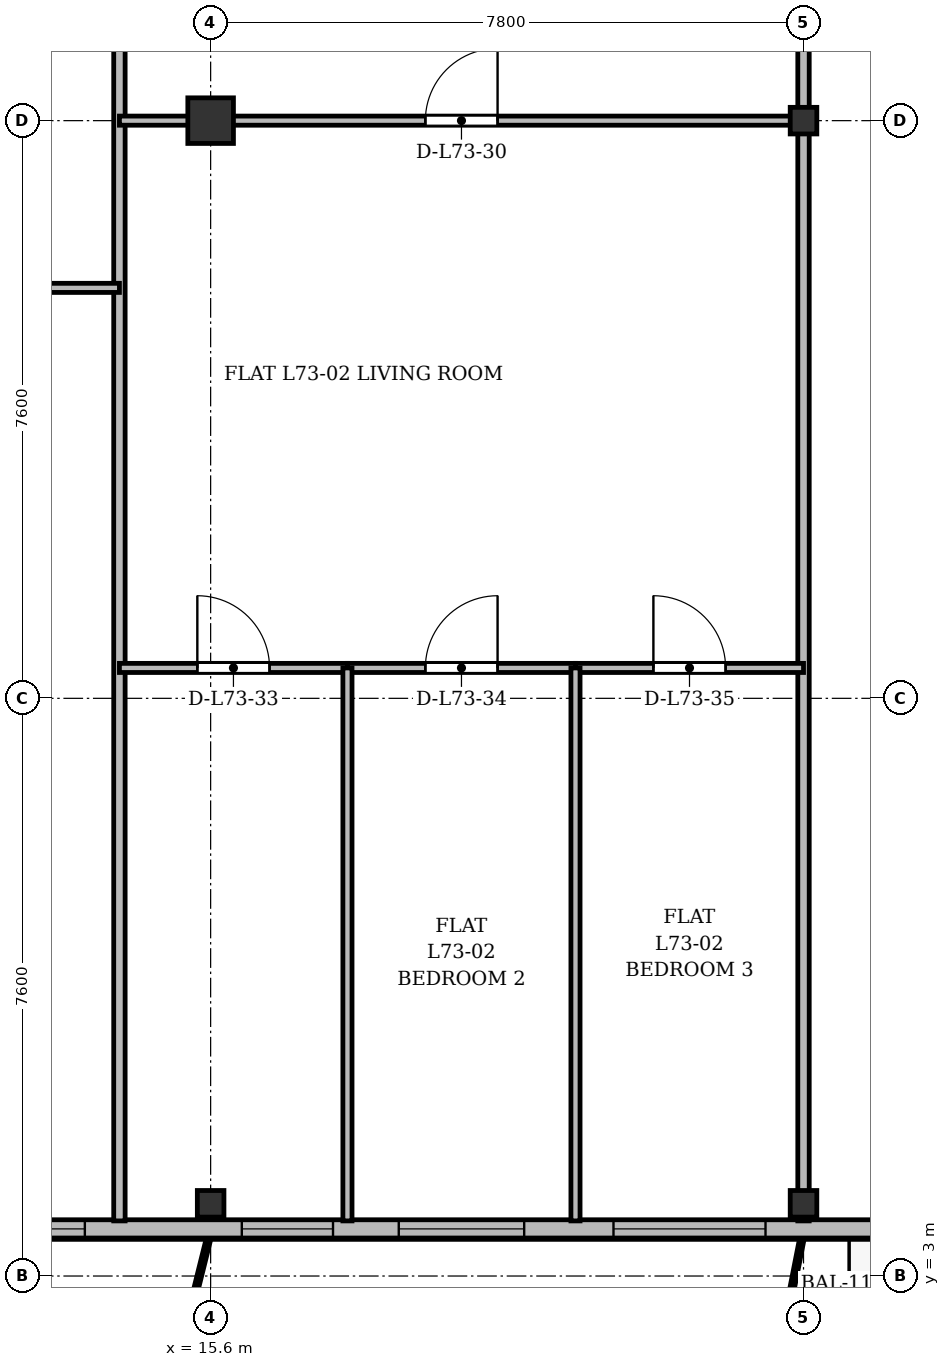
"""IFC4 building model, lengths in metres.
Left out: names, types, materials, properties, quantities, classifications, styles, units other than length and angle.
Written with IfcOpenShell. Run it as: python <this file> out.ifc"""

import sys

from ifc_helpers import new_model, si_unit, direction, frame, frame_2d, origin, origin_2d, place, context, subcontext, project, spatial, rectangle, i_section, extrude, source, transform, mapped, element, fill, save


model = new_model("IFC4")
c1 = context("Model", 3, precision=1e-05, world=origin(), true_north=direction((0.0, 1.0)))
c2 = subcontext(c1, "Body", "Model", "MODEL_VIEW")
j1 = project(units=[si_unit("LENGTHUNIT", "METRE"), si_unit("PLANEANGLEUNIT", "RADIAN")], contexts=[c1])
p1 = place(None, origin())
s1 = spatial("IfcSite", under=j1, at=p1, CompositionType="ELEMENT")
p2 = place(p1, origin())
s2 = spatial("IfcBuilding", under=s1, at=p2, CompositionType="ELEMENT")
p3 = place(p2, frame((0.0, 0.0, 281.1)))
s3 = spatial("IfcBuildingStorey", under=s2, at=p3, CompositionType="ELEMENT", Elevation=281.1)
m1 = source(origin(), c2, "Body", "SweptSolid", [
    extrude(i_section(OverallWidth=0.35, OverallDepth=0.35, WebThickness=0.018, FlangeThickness=0.028, at=origin_2d()), origin(), (0.0, 0.0, 1.0), 3.6),
])
p4 = place(p3, frame((15.6, 3.95, 0.0), z_axis=(0.0, 0.0, 1.0), x_axis=(1.0, 0.0, 0.0)))
e1 = element("IfcColumn", 1, at=p4, inside=s3, PredefinedType="COLUMN", context=c2, shape_type="MappedRepresentation", body=[
    mapped(m1, transform((0.0, 0.0, 0.0), x_axis=(1.0, 0.0, 0.0), y_axis=(0.0, 1.0, 0.0), z_axis=(0.0, 0.0, 1.0), scale=1.0)),
])
m2 = source(origin(), c2, "Body", "SweptSolid", [
    extrude(rectangle(XDim=0.6, YDim=0.6, at=origin_2d()), origin(), (0.0, 0.0, 1.0), 3.6),
])
p5 = place(p3, frame((15.6, 18.2, 0.0), z_axis=(0.0, 0.0, 1.0), x_axis=(1.0, 0.0, 0.0)))
e2 = element("IfcColumn", 2, at=p5, inside=s3, PredefinedType="COLUMN", context=c2, shape_type="MappedRepresentation", body=[
    mapped(m2, transform((0.0, 0.0, 0.0), x_axis=(1.0, 0.0, 0.0), y_axis=(0.0, 1.0, 0.0), z_axis=(0.0, 0.0, 1.0), scale=1.0)),
])
for number, where, z_axis, x_axis in (
    (3, (23.4, 3.95, 0.0), (0.0, 0.0, 1.0), (1.0, 0.0, 0.0)),
    (4, (23.4, 18.2, 0.0), (0.0, 0.0, 1.0), (1.0, 0.0, 0.0)),
):
    element("IfcColumn", number, at=place(p3, frame(where, z_axis=z_axis, x_axis=x_axis)), inside=s3, PredefinedType="COLUMN", context=c2, shape_type="MappedRepresentation", body=[
        mapped(m1, transform((0.0, 0.0, 0.0), x_axis=(1.0, 0.0, 0.0), y_axis=(0.0, 1.0, 0.0), z_axis=(0.0, 0.0, 1.0), scale=1.0)),
    ])
p6 = place(p3, frame((63.2, 3.62, 0.0), z_axis=(0.0, 0.0, 1.0), x_axis=(-1.0, 0.0, 0.0)))
e5 = element("IfcWall", 5, at=p6, inside=s3, PredefinedType="SOLIDWALL", context=c2, shape_type="SweptSolid", body=[
    extrude(rectangle(XDim=52.0, YDim=0.24, at=frame_2d((26.0, 0.0))), origin(), (0.0, 0.0, 1.0), 3.37),
])
p7 = place(p6, frame((0.745, 0.0, 0.9)))
e6 = element("IfcOpeningElement", 6, at=p7, cuts=e5, PredefinedType="OPENING", context=c2, shape_type="SweptSolid", body=[
    extrude(rectangle(XDim=2.0, YDim=1.95, at=frame_2d((1.0, 0.975))), frame((0.0, 0.13, 0.0), z_axis=(0.0, -1.0, 0.0), x_axis=(1.0, 0.0, 0.0)), (0.0, 0.0, 1.0), 0.26),
])
p8 = place(p6, frame((4.793, 0.0, 0.9)))
e7 = element("IfcOpeningElement", 7, at=p8, cuts=e5, PredefinedType="OPENING", context=c2, shape_type="SweptSolid", body=[
    extrude(rectangle(XDim=1.35, YDim=1.5, at=frame_2d((0.675, 0.75))), frame((0.0, 0.13, 0.0), z_axis=(0.0, -1.0, 0.0), x_axis=(1.0, 0.0, 0.0)), (0.0, 0.0, 1.0), 0.26),
])
p9 = place(p6, frame((6.685, 0.0, 0.0)))
e8 = element("IfcOpeningElement", 8, at=p9, cuts=e5, PredefinedType="OPENING", context=c2, shape_type="SweptSolid", body=[
    extrude(rectangle(XDim=1.2, YDim=2.2, at=frame_2d((0.6, 1.1))), frame((0.0, 0.13, 0.0), z_axis=(0.0, -1.0, 0.0), x_axis=(1.0, 0.0, 0.0)), (0.0, 0.0, 1.0), 0.26),
])
p10 = place(p6, frame((9.634, 0.0, 0.9)))
e9 = element("IfcOpeningElement", 9, at=p10, cuts=e5, PredefinedType="OPENING", context=c2, shape_type="SweptSolid", body=[
    extrude(rectangle(XDim=2.2, YDim=1.8, at=frame_2d((1.1, 0.9))), frame((0.0, 0.13, 0.0), z_axis=(0.0, -1.0, 0.0), x_axis=(1.0, 0.0, 0.0)), (0.0, 0.0, 1.0), 0.26),
])
p11 = place(p6, frame((13.45, 0.0, 0.9)))
e10 = element("IfcOpeningElement", 10, at=p11, cuts=e5, PredefinedType="OPENING", context=c2, shape_type="SweptSolid", body=[
    extrude(rectangle(XDim=1.5, YDim=1.75, at=frame_2d((0.75, 0.875))), frame((0.0, 0.13, 0.0), z_axis=(0.0, -1.0, 0.0), x_axis=(1.0, 0.0, 0.0)), (0.0, 0.0, 1.0), 0.26),
])
p12 = place(p6, frame((16.8, 0.0, 0.9)))
e11 = element("IfcOpeningElement", 11, at=p12, cuts=e5, PredefinedType="OPENING", context=c2, shape_type="SweptSolid", body=[
    extrude(rectangle(XDim=2.0, YDim=1.95, at=frame_2d((1.0, 0.975))), frame((0.0, 0.13, 0.0), z_axis=(0.0, -1.0, 0.0), x_axis=(1.0, 0.0, 0.0)), (0.0, 0.0, 1.0), 0.26),
])
p13 = place(p6, frame((21.375, 0.0, 0.9)))
e12 = element("IfcOpeningElement", 12, at=p13, cuts=e5, PredefinedType="OPENING", context=c2, shape_type="SweptSolid", body=[
    extrude(rectangle(XDim=1.65, YDim=1.85, at=frame_2d((0.825, 0.925))), frame((0.0, 0.13, 0.0), z_axis=(0.0, -1.0, 0.0), x_axis=(1.0, 0.0, 0.0)), (0.0, 0.0, 1.0), 0.26),
])
p14 = place(p6, frame((27.9, 0.0, 0.9)))
e13 = element("IfcOpeningElement", 13, at=p14, cuts=e5, PredefinedType="OPENING", context=c2, shape_type="SweptSolid", body=[
    extrude(rectangle(XDim=1.8, YDim=1.8, at=frame_2d((0.9, 0.9))), frame((0.0, 0.13, 0.0), z_axis=(0.0, -1.0, 0.0), x_axis=(1.0, 0.0, 0.0)), (0.0, 0.0, 1.0), 0.26),
])
p15 = place(p6, frame((33.873, 0.0, 0.0)))
e14 = element("IfcOpeningElement", 14, at=p15, cuts=e5, PredefinedType="OPENING", context=c2, shape_type="SweptSolid", body=[
    extrude(rectangle(XDim=1.2, YDim=2.2, at=frame_2d((0.6, 1.1))), frame((0.0, 0.13, 0.0), z_axis=(0.0, -1.0, 0.0), x_axis=(1.0, 0.0, 0.0)), (0.0, 0.0, 1.0), 0.26),
])
p16 = place(p6, frame((37.05, 0.0, 0.9)))
e15 = element("IfcOpeningElement", 15, at=p16, cuts=e5, PredefinedType="OPENING", context=c2, shape_type="SweptSolid", body=[
    extrude(rectangle(XDim=1.5, YDim=1.75, at=frame_2d((0.75, 0.875))), frame((0.0, 0.13, 0.0), z_axis=(0.0, -1.0, 0.0), x_axis=(1.0, 0.0, 0.0)), (0.0, 0.0, 1.0), 0.26),
])
p17 = place(p6, frame((40.3, 0.0, 0.9)))
e16 = element("IfcOpeningElement", 16, at=p17, cuts=e5, PredefinedType="OPENING", context=c2, shape_type="SweptSolid", body=[
    extrude(rectangle(XDim=2.0, YDim=1.95, at=frame_2d((1.0, 0.975))), frame((0.0, 0.13, 0.0), z_axis=(0.0, -1.0, 0.0), x_axis=(1.0, 0.0, 0.0)), (0.0, 0.0, 1.0), 0.26),
])
p18 = place(p6, frame((43.475, 0.0, 0.9)))
e17 = element("IfcOpeningElement", 17, at=p18, cuts=e5, PredefinedType="OPENING", context=c2, shape_type="SweptSolid", body=[
    extrude(rectangle(XDim=1.65, YDim=1.85, at=frame_2d((0.825, 0.925))), frame((0.0, 0.13, 0.0), z_axis=(0.0, -1.0, 0.0), x_axis=(1.0, 0.0, 0.0)), (0.0, 0.0, 1.0), 0.26),
])
p19 = place(p6, frame((45.99, 0.0, 0.9)))
e18 = element("IfcOpeningElement", 18, at=p19, cuts=e5, PredefinedType="OPENING", context=c2, shape_type="SweptSolid", body=[
    extrude(rectangle(XDim=1.2, YDim=1.65, at=frame_2d((0.6, 0.825))), frame((0.0, 0.13, 0.0), z_axis=(0.0, -1.0, 0.0), x_axis=(1.0, 0.0, 0.0)), (0.0, 0.0, 1.0), 0.26),
])
p20 = place(p6, frame((49.255, 0.0, 0.9)))
e19 = element("IfcOpeningElement", 19, at=p20, cuts=e5, PredefinedType="OPENING", context=c2, shape_type="SweptSolid", body=[
    extrude(rectangle(XDim=2.2, YDim=1.8, at=frame_2d((1.1, 0.9))), frame((0.0, 0.13, 0.0), z_axis=(0.0, -1.0, 0.0), x_axis=(1.0, 0.0, 0.0)), (0.0, 0.0, 1.0), 0.26),
])
p21 = place(p3, frame((14.4, 3.725, 0.0), z_axis=(0.0, 0.0, 1.0), x_axis=(0.0, 1.0, 0.0)))
e20 = element("IfcWall", 20, at=p21, inside=s3, PredefinedType="PARTITIONING", context=c2, shape_type="SweptSolid", body=[
    extrude(rectangle(XDim=27.275, YDim=0.15, at=frame_2d((13.637, 0.0))), origin(), (0.0, 0.0, 1.0), 2.92),
])
p22 = place(p3, frame((23.4, 3.725, 0.0), z_axis=(0.0, 0.0, 1.0), x_axis=(0.0, 1.0, 0.0)))
e21 = element("IfcWall", 21, at=p22, inside=s3, PredefinedType="PARTITIONING", context=c2, shape_type="SweptSolid", body=[
    extrude(rectangle(XDim=27.275, YDim=0.15, at=frame_2d((13.637, 0.0))), origin(), (0.0, 0.0, 1.0), 2.87),
])
p23 = place(p3, frame((8.425, 16.0, 0.0), z_axis=(0.0, 0.0, 1.0), x_axis=(1.0, 0.0, 0.0)))
e22 = element("IfcWall", 22, at=p23, inside=s3, PredefinedType="PARTITIONING", context=c2, shape_type="SweptSolid", body=[
    extrude(rectangle(XDim=5.975, YDim=0.12, at=frame_2d((2.987, 0.0))), origin(), (0.0, 0.0, 1.0), 2.87),
])
p24 = place(p23, frame((2.42, 0.0, 0.0)))
e23 = element("IfcOpeningElement", 23, at=p24, cuts=e22, PredefinedType="OPENING", context=c2, shape_type="SweptSolid", body=[
    extrude(rectangle(XDim=0.95, YDim=2.15, at=frame_2d((0.475, 1.075))), frame((0.0, 0.07, 0.0), z_axis=(0.0, -1.0, 0.0), x_axis=(1.0, 0.0, 0.0)), (0.0, 0.0, 1.0), 0.14),
])
p25 = place(p3, frame((14.4, 18.2, 0.0), z_axis=(0.0, 0.0, 1.0), x_axis=(1.0, 0.0, 0.0)))
e24 = element("IfcWall", 24, at=p25, inside=s3, PredefinedType="PARTITIONING", context=c2, shape_type="SweptSolid", body=[
    extrude(rectangle(XDim=9.0, YDim=0.12, at=frame_2d((4.5, 0.0))), origin(), (0.0, 0.0, 1.0), 2.92),
])
p26 = place(p25, frame((4.025, 0.0, 0.0)))
e25 = element("IfcOpeningElement", 25, at=p26, cuts=e24, PredefinedType="OPENING", context=c2, shape_type="SweptSolid", body=[
    extrude(rectangle(XDim=0.95, YDim=2.15, at=frame_2d((0.475, 1.075))), frame((0.0, 0.07, 0.0), z_axis=(0.0, -1.0, 0.0), x_axis=(1.0, 0.0, 0.0)), (0.0, 0.0, 1.0), 0.14),
])
p27 = place(p3, frame((14.4, 11.0, 0.0), z_axis=(0.0, 0.0, 1.0), x_axis=(1.0, 0.0, 0.0)))
e26 = element("IfcWall", 26, at=p27, inside=s3, PredefinedType="PARTITIONING", context=c2, shape_type="SweptSolid", body=[
    extrude(rectangle(XDim=3.0, YDim=0.12, at=frame_2d((1.5, 0.0))), origin(), (0.0, 0.0, 1.0), 2.87),
])
p28 = place(p27, frame((1.025, 0.0, 0.0)))
e27 = element("IfcOpeningElement", 27, at=p28, cuts=e26, PredefinedType="OPENING", context=c2, shape_type="SweptSolid", body=[
    extrude(rectangle(XDim=0.95, YDim=2.15, at=frame_2d((0.475, 1.075))), frame((0.0, 0.07, 0.0), z_axis=(0.0, -1.0, 0.0), x_axis=(1.0, 0.0, 0.0)), (0.0, 0.0, 1.0), 0.14),
])
p29 = place(p3, frame((17.4, 11.0, 0.0), z_axis=(0.0, 0.0, 1.0), x_axis=(1.0, 0.0, 0.0)))
e28 = element("IfcWall", 28, at=p29, inside=s3, PredefinedType="PARTITIONING", context=c2, shape_type="SweptSolid", body=[
    extrude(rectangle(XDim=3.0, YDim=0.12, at=frame_2d((1.5, 0.0))), origin(), (0.0, 0.0, 1.0), 3.37),
])
p30 = place(p29, frame((1.025, 0.0, 0.0)))
e29 = element("IfcOpeningElement", 29, at=p30, cuts=e28, PredefinedType="OPENING", context=c2, shape_type="SweptSolid", body=[
    extrude(rectangle(XDim=0.95, YDim=2.15, at=frame_2d((0.475, 1.075))), frame((0.0, 0.07, 0.0), z_axis=(0.0, -1.0, 0.0), x_axis=(1.0, 0.0, 0.0)), (0.0, 0.0, 1.0), 0.14),
])
p31 = place(p3, frame((17.4, 3.725, 0.0), z_axis=(0.0, 0.0, 1.0), x_axis=(0.0, 1.0, 0.0)))
e30 = element("IfcWall", 30, at=p31, inside=s3, PredefinedType="PARTITIONING", context=c2, shape_type="SweptSolid", body=[
    extrude(rectangle(XDim=7.275, YDim=0.12, at=frame_2d((3.637, 0.0))), origin(), (0.0, 0.0, 1.0), 2.92),
])
p32 = place(p3, frame((20.4, 11.0, 0.0), z_axis=(0.0, 0.0, 1.0), x_axis=(1.0, 0.0, 0.0)))
e31 = element("IfcWall", 31, at=p32, inside=s3, PredefinedType="PARTITIONING", context=c2, shape_type="SweptSolid", body=[
    extrude(rectangle(XDim=3.0, YDim=0.12, at=frame_2d((1.5, 0.0))), origin(), (0.0, 0.0, 1.0), 2.87),
])
p33 = place(p32, frame((1.025, 0.0, 0.0)))
e32 = element("IfcOpeningElement", 32, at=p33, cuts=e31, PredefinedType="OPENING", context=c2, shape_type="SweptSolid", body=[
    extrude(rectangle(XDim=0.95, YDim=2.15, at=frame_2d((0.475, 1.075))), frame((0.0, 0.07, 0.0), z_axis=(0.0, -1.0, 0.0), x_axis=(1.0, 0.0, 0.0)), (0.0, 0.0, 1.0), 0.14),
])
p34 = place(p3, frame((20.4, 3.725, 0.0), z_axis=(0.0, 0.0, 1.0), x_axis=(0.0, 1.0, 0.0)))
e33 = element("IfcWall", 33, at=p34, inside=s3, PredefinedType="PARTITIONING", context=c2, shape_type="SweptSolid", body=[
    extrude(rectangle(XDim=7.275, YDim=0.12, at=frame_2d((3.637, 0.0))), origin(), (0.0, 0.0, 1.0), 2.92),
])
m3 = source(origin(), c2, "Body", "SweptSolid", [
    extrude(rectangle(XDim=2.0, YDim=1.95, at=frame_2d((1.0, 0.975))), frame((0.0, 0.03, 0.0), z_axis=(0.0, -1.0, 0.0), x_axis=(1.0, 0.0, 0.0)), (0.0, 0.0, 1.0), 0.06),
])
p35 = place(p17, origin())
e34 = element("IfcWindow", 34, at=p35, inside=s3, PartitioningType="SINGLE_PANEL", PredefinedType="WINDOW", context=c2, shape_type="MappedRepresentation", body=[
    mapped(m3, transform((0.0, 0.0, 0.0), x_axis=(1.0, 0.0, 0.0), y_axis=(0.0, 1.0, 0.0), z_axis=(0.0, 0.0, 1.0), scale=1.0)),
])
fill(e16, e34)
m4 = source(origin(), c2, "Body", "SweptSolid", [
    extrude(rectangle(XDim=1.65, YDim=1.85, at=frame_2d((0.825, 0.925))), frame((0.0, 0.03, 0.0), z_axis=(0.0, -1.0, 0.0), x_axis=(1.0, 0.0, 0.0)), (0.0, 0.0, 1.0), 0.06),
])
p36 = place(p18, origin())
e35 = element("IfcWindow", 35, at=p36, inside=s3, PartitioningType="SINGLE_PANEL", PredefinedType="WINDOW", context=c2, shape_type="MappedRepresentation", body=[
    mapped(m4, transform((0.0, 0.0, 0.0), x_axis=(1.0, 0.0, 0.0), y_axis=(0.0, 1.0, 0.0), z_axis=(0.0, 0.0, 1.0), scale=1.0)),
])
fill(e17, e35)
m5 = source(origin(), c2, "Body", "SweptSolid", [
    extrude(rectangle(XDim=1.2, YDim=1.65, at=frame_2d((0.6, 0.825))), frame((0.0, 0.03, 0.0), z_axis=(0.0, -1.0, 0.0), x_axis=(1.0, 0.0, 0.0)), (0.0, 0.0, 1.0), 0.06),
])
p37 = place(p19, origin())
e36 = element("IfcWindow", 36, at=p37, inside=s3, PartitioningType="SINGLE_PANEL", PredefinedType="WINDOW", context=c2, shape_type="MappedRepresentation", body=[
    mapped(m5, transform((0.0, 0.0, 0.0), x_axis=(1.0, 0.0, 0.0), y_axis=(0.0, 1.0, 0.0), z_axis=(0.0, 0.0, 1.0), scale=1.0)),
])
fill(e18, e36)
m6 = source(origin(), c2, "Body", "SweptSolid", [
    extrude(rectangle(XDim=2.2, YDim=1.8, at=frame_2d((1.1, 0.9))), frame((0.0, 0.03, 0.0), z_axis=(0.0, -1.0, 0.0), x_axis=(1.0, 0.0, 0.0)), (0.0, 0.0, 1.0), 0.06),
])
p38 = place(p20, origin())
e37 = element("IfcWindow", 37, at=p38, inside=s3, PartitioningType="SINGLE_PANEL", PredefinedType="WINDOW", context=c2, shape_type="MappedRepresentation", body=[
    mapped(m6, transform((0.0, 0.0, 0.0), x_axis=(1.0, 0.0, 0.0), y_axis=(0.0, 1.0, 0.0), z_axis=(0.0, 0.0, 1.0), scale=1.0)),
])
fill(e19, e37)
m7 = source(origin(), c2, "Body", "SweptSolid", [
    extrude(rectangle(XDim=0.95, YDim=2.15, at=frame_2d((0.475, 1.075))), frame((0.0, 0.025, 0.0), z_axis=(0.0, -1.0, 0.0), x_axis=(1.0, 0.0, 0.0)), (0.0, 0.0, 1.0), 0.05),
])
p39 = place(p26, origin())
e38 = element("IfcDoor", 38, at=p39, inside=s3, OperationType="SINGLE_SWING_RIGHT", PredefinedType="DOOR", context=c2, shape_type="MappedRepresentation", body=[
    mapped(m7, transform((0.0, 0.0, 0.0), x_axis=(1.0, 0.0, 0.0), y_axis=(0.0, 1.0, 0.0), z_axis=(0.0, 0.0, 1.0), scale=1.0)),
])
fill(e25, e38)
p40 = place(p28, origin())
e39 = element("IfcDoor", 39, at=p40, inside=s3, OperationType="SINGLE_SWING_LEFT", PredefinedType="DOOR", context=c2, shape_type="MappedRepresentation", body=[
    mapped(m7, transform((0.0, 0.0, 0.0), x_axis=(1.0, 0.0, 0.0), y_axis=(0.0, 1.0, 0.0), z_axis=(0.0, 0.0, 1.0), scale=1.0)),
])
fill(e27, e39)
p41 = place(p30, origin())
e40 = element("IfcDoor", 40, at=p41, inside=s3, OperationType="SINGLE_SWING_RIGHT", PredefinedType="DOOR", context=c2, shape_type="MappedRepresentation", body=[
    mapped(m7, transform((0.0, 0.0, 0.0), x_axis=(1.0, 0.0, 0.0), y_axis=(0.0, 1.0, 0.0), z_axis=(0.0, 0.0, 1.0), scale=1.0)),
])
fill(e29, e40)
p42 = place(p33, origin())
e41 = element("IfcDoor", 41, at=p42, inside=s3, OperationType="SINGLE_SWING_LEFT", PredefinedType="DOOR", context=c2, shape_type="MappedRepresentation", body=[
    mapped(m7, transform((0.0, 0.0, 0.0), x_axis=(1.0, 0.0, 0.0), y_axis=(0.0, 1.0, 0.0), z_axis=(0.0, 0.0, 1.0), scale=1.0)),
])
fill(e32, e41)
save(model, sys.argv[1])
